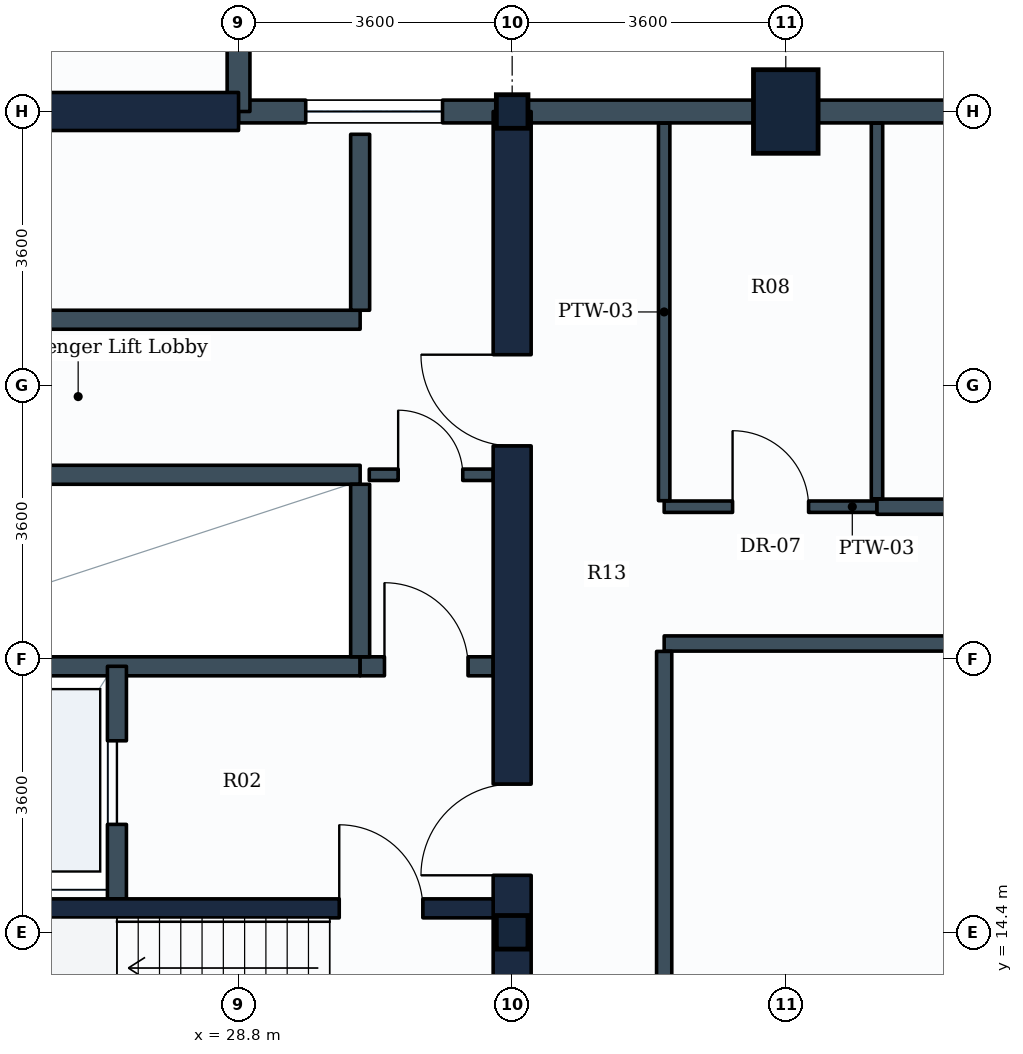
"""IFC4 building model, lengths in metres.
Left out: names, types, materials, properties, quantities, classifications, styles, units other than length and angle.
Written with IfcOpenShell. Run it as: python <this file> out.ifc"""

import sys

from ifc_helpers import new_model, si_unit, direction, frame, frame_2d, origin, origin_2d, place, context, subcontext, project, spatial, rectangle, i_section, extrude, element, fill, save


model = new_model("IFC4")
c1 = context("Model", 3, precision=1e-05, world=origin(), true_north=direction((0.0, 1.0)))
c2 = subcontext(c1, "Body", "Model", "MODEL_VIEW")
j1 = project(units=[si_unit("LENGTHUNIT", "METRE"), si_unit("PLANEANGLEUNIT", "RADIAN")], contexts=[c1])
p1 = place(None, origin())
s1 = spatial("IfcSite", under=j1, at=p1, CompositionType="ELEMENT")
p2 = place(p1, origin())
s2 = spatial("IfcBuilding", under=s1, at=p2, CompositionType="ELEMENT")
p3 = place(p2, frame((0.0, 0.0, 120.0)))
s3 = spatial("IfcBuildingStorey", under=s2, at=p3, CompositionType="ELEMENT", Elevation=120.0)
for number, where, z_axis, x_axis in (
    (1, (32.4, 14.4, 0.0), (0.0, 0.0, 1.0), (1.0, 0.0, 0.0)),
    (2, (32.4, 25.2, 0.0), (0.0, 0.0, 1.0), (1.0, 0.0, 0.0)),
):
    element("IfcColumn", number, at=place(p3, frame(where, z_axis=z_axis, x_axis=x_axis)), inside=s3, PredefinedType="COLUMN", context=c2, shape_type="SweptSolid", body=[
        extrude(i_section(OverallWidth=0.416, OverallDepth=0.442, WebThickness=0.025, FlangeThickness=0.041, FilletRadius=0.015, at=origin_2d()), origin(), (0.0, 0.0, 1.0), 3.8),
    ])
p4 = place(p3, frame((36.0, 25.2, 0.0), z_axis=(0.0, 0.0, 1.0), x_axis=(1.0, 0.0, 0.0)))
e3 = element("IfcColumn", 3, at=p4, inside=s3, PredefinedType="COLUMN", context=c2, shape_type="SweptSolid", body=[
    extrude(rectangle(XDim=0.85, YDim=1.1, at=origin_2d()), origin(), (0.0, 0.0, 1.0), 3.8),
])
for number, where, z_axis, x_axis in (
    (4, (36.0, 25.2, 0.0), (0.0, 0.0, 1.0), (1.0, 0.0, 0.0)),
    (5, (32.4, 25.2, 0.0), (0.0, 0.0, 1.0), (1.0, 0.0, 0.0)),
):
    element("IfcWall", number, at=place(p3, frame(where, z_axis=z_axis, x_axis=x_axis)), inside=s3, PredefinedType="STANDARD", context=c2, shape_type="SweptSolid", body=[
        extrude(rectangle(XDim=3.6, YDim=0.3, at=frame_2d((1.8, 0.0))), origin(), (0.0, 0.0, 1.0), 2.93),
    ])
p5 = place(p3, frame((28.8, 25.2, 0.0), z_axis=(0.0, 0.0, 1.0), x_axis=(1.0, 0.0, 0.0)))
e6 = element("IfcWall", 6, at=p5, inside=s3, PredefinedType="STANDARD", context=c2, shape_type="SweptSolid", body=[
    extrude(rectangle(XDim=3.6, YDim=0.3, at=frame_2d((1.8, 0.0))), origin(), (0.0, 0.0, 1.0), 3.535),
])
p6 = place(p5, frame((0.884, 0.0, 0.85)))
e7 = element("IfcOpeningElement", 7, at=p6, cuts=e6, PredefinedType="OPENING", context=c2, shape_type="SweptSolid", body=[
    extrude(rectangle(XDim=1.8, YDim=1.35, at=frame_2d((0.9, 0.675))), frame((0.0, 0.16, 0.0), z_axis=(0.0, -1.0, 0.0), x_axis=(1.0, 0.0, 0.0)), (0.0, 0.0, 1.0), 0.32),
])
p7 = place(p3, frame((28.8, 28.8, 0.0), z_axis=(0.0, 0.0, 1.0), x_axis=(0.0, -1.0, 0.0)))
e8 = element("IfcWall", 8, at=p7, inside=s3, PredefinedType="STANDARD", context=c2, shape_type="SweptSolid", body=[
    extrude(rectangle(XDim=3.6, YDim=0.3, at=frame_2d((1.8, 0.0))), origin(), (0.0, 0.0, 1.0), 3.09),
])
p8 = place(p3, frame((14.4, 25.2, 0.0), z_axis=(0.0, 0.0, 1.0), x_axis=(1.0, 0.0, 0.0)))
e9 = element("IfcWall", 9, at=p8, inside=s3, PredefinedType="SHEAR", context=c2, shape_type="SweptSolid", body=[
    extrude(rectangle(XDim=14.4, YDim=0.5, at=frame_2d((7.2, 0.0))), origin(), (0.0, 0.0, 1.0), 3.55),
])
p9 = place(p3, frame((32.4, 10.8, 0.0), z_axis=(0.0, 0.0, 1.0), x_axis=(0.0, 1.0, 0.0)))
e10 = element("IfcWall", 10, at=p9, inside=s3, PredefinedType="SHEAR", context=c2, shape_type="SweptSolid", body=[
    extrude(rectangle(XDim=14.4, YDim=0.5, at=frame_2d((7.2, 0.0))), origin(), (0.0, 0.0, 1.0), 3.55),
])
p10 = place(p9, frame((4.35, 0.0, 0.0)))
e11 = element("IfcOpeningElement", 11, at=p10, cuts=e10, PredefinedType="OPENING", context=c2, shape_type="SweptSolid", body=[
    extrude(rectangle(XDim=1.2, YDim=2.1, at=frame_2d((0.6, 1.05))), frame((0.0, 0.26, 0.0), z_axis=(0.0, -1.0, 0.0), x_axis=(1.0, 0.0, 0.0)), (0.0, 0.0, 1.0), 0.52),
])
p11 = place(p9, frame((10.0, 0.0, 0.0)))
e12 = element("IfcOpeningElement", 12, at=p11, cuts=e10, PredefinedType="OPENING", context=c2, shape_type="SweptSolid", body=[
    extrude(rectangle(XDim=1.2, YDim=2.1, at=frame_2d((0.6, 1.05))), frame((0.0, 0.26, 0.0), z_axis=(0.0, -1.0, 0.0), x_axis=(1.0, 0.0, 0.0)), (0.0, 0.0, 1.0), 0.52),
])
p12 = place(p3, frame((23.35, 14.715, 0.0), z_axis=(0.0, 0.0, 1.0), x_axis=(1.0, 0.0, 0.0)))
e13 = element("IfcWall", 13, at=p12, inside=s3, PredefinedType="SHEAR", context=c2, shape_type="SweptSolid", body=[
    extrude(rectangle(XDim=8.8, YDim=0.25, at=frame_2d((4.4, 0.0))), origin(), (0.0, 0.0, 1.0), 3.55),
])
p13 = place(p12, frame((6.775, 0.0, 0.0)))
e14 = element("IfcOpeningElement", 14, at=p13, cuts=e13, PredefinedType="OPENING", context=c2, shape_type="SweptSolid", body=[
    extrude(rectangle(XDim=1.1, YDim=2.1, at=frame_2d((0.55, 1.05))), frame((0.0, 0.135, 0.0), z_axis=(0.0, -1.0, 0.0), x_axis=(1.0, 0.0, 0.0)), (0.0, 0.0, 1.0), 0.27),
])
p14 = place(p3, frame((21.88, 17.9, 0.0), z_axis=(0.0, 0.0, 1.0), x_axis=(1.0, 0.0, 0.0)))
e15 = element("IfcWall", 15, at=p14, inside=s3, PredefinedType="PARTITIONING", context=c2, shape_type="SweptSolid", body=[
    extrude(rectangle(XDim=8.52, YDim=0.25, at=frame_2d((4.26, 0.0))), origin(), (0.0, 0.0, 1.0), 3.535),
])
p15 = place(p3, frame((30.4, 17.9, 0.0), z_axis=(0.0, 0.0, 1.0), x_axis=(1.0, 0.0, 0.0)))
e16 = element("IfcWall", 16, at=p15, inside=s3, PredefinedType="PARTITIONING", context=c2, shape_type="SweptSolid", body=[
    extrude(rectangle(XDim=1.75, YDim=0.25, at=frame_2d((0.875, 0.0))), origin(), (0.0, 0.0, 1.0), 3.535),
])
p16 = place(p15, frame((0.32, 0.0, 0.0)))
e17 = element("IfcOpeningElement", 17, at=p16, cuts=e16, PredefinedType="OPENING", context=c2, shape_type="SweptSolid", body=[
    extrude(rectangle(XDim=1.1, YDim=2.1, at=frame_2d((0.55, 1.05))), frame((0.0, 0.135, 0.0), z_axis=(0.0, -1.0, 0.0), x_axis=(1.0, 0.0, 0.0)), (0.0, 0.0, 1.0), 0.27),
])
p17 = place(p3, frame((27.2, 14.84, 0.0), z_axis=(0.0, 0.0, 1.0), x_axis=(0.0, 1.0, 0.0)))
e18 = element("IfcWall", 18, at=p17, inside=s3, PredefinedType="PARTITIONING", context=c2, shape_type="SweptSolid", body=[
    extrude(rectangle(XDim=3.06, YDim=0.25, at=frame_2d((1.53, 0.0))), origin(), (0.0, 0.0, 1.0), 3.535),
])
p18 = place(p17, frame((0.98, 0.0, 0.0)))
e19 = element("IfcOpeningElement", 19, at=p18, cuts=e18, PredefinedType="OPENING", context=c2, shape_type="SweptSolid", body=[
    extrude(rectangle(XDim=1.1, YDim=2.1, at=frame_2d((0.55, 1.05))), frame((0.0, 0.135, 0.0), z_axis=(0.0, -1.0, 0.0), x_axis=(1.0, 0.0, 0.0)), (0.0, 0.0, 1.0), 0.27),
])
p19 = place(p3, frame((23.18, 20.42, 0.0), z_axis=(0.0, 0.0, 1.0), x_axis=(1.0, 0.0, 0.0)))
e20 = element("IfcWall", 20, at=p19, inside=s3, PredefinedType="PARTITIONING", context=c2, shape_type="SweptSolid", body=[
    extrude(rectangle(XDim=7.22, YDim=0.25, at=frame_2d((3.61, 0.0))), origin(), (0.0, 0.0, 1.0), 3.535),
])
p20 = place(p3, frame((30.4, 18.025, 0.0), z_axis=(0.0, 0.0, 1.0), x_axis=(0.0, 1.0, 0.0)))
e21 = element("IfcWall", 21, at=p20, inside=s3, PredefinedType="PARTITIONING", context=c2, shape_type="SweptSolid", body=[
    extrude(rectangle(XDim=2.27, YDim=0.25, at=frame_2d((1.135, 0.0))), origin(), (0.0, 0.0, 1.0), 3.535),
])
p21 = place(p3, frame((23.18, 22.46, 0.0), z_axis=(0.0, 0.0, 1.0), x_axis=(1.0, 0.0, 0.0)))
e22 = element("IfcWall", 22, at=p21, inside=s3, PredefinedType="PARTITIONING", context=c2, shape_type="SweptSolid", body=[
    extrude(rectangle(XDim=7.22, YDim=0.25, at=frame_2d((3.61, 0.0))), origin(), (0.0, 0.0, 1.0), 3.535),
])
p22 = place(p3, frame((30.4, 22.585, 0.0), z_axis=(0.0, 0.0, 1.0), x_axis=(0.0, 1.0, 0.0)))
e23 = element("IfcWall", 23, at=p22, inside=s3, PredefinedType="PARTITIONING", context=c2, shape_type="SweptSolid", body=[
    extrude(rectangle(XDim=2.315, YDim=0.25, at=frame_2d((1.157, 0.0))), origin(), (0.0, 0.0, 1.0), 3.535),
])
p23 = place(p3, frame((30.52, 20.42, 0.0), z_axis=(0.0, 0.0, 1.0), x_axis=(1.0, 0.0, 0.0)))
e24 = element("IfcWall", 24, at=p23, inside=s3, PredefinedType="PARTITIONING", context=c2, shape_type="SweptSolid", body=[
    extrude(rectangle(XDim=1.63, YDim=0.15, at=frame_2d((0.815, 0.0))), origin(), (0.0, 0.0, 1.0), 3.535),
])
p24 = place(p23, frame((0.38, 0.0, 0.0)))
e25 = element("IfcOpeningElement", 25, at=p24, cuts=e24, PredefinedType="OPENING", context=c2, shape_type="SweptSolid", body=[
    extrude(rectangle(XDim=0.85, YDim=2.1, at=frame_2d((0.425, 1.05))), frame((0.0, 0.085, 0.0), z_axis=(0.0, -1.0, 0.0), x_axis=(1.0, 0.0, 0.0)), (0.0, 0.0, 1.0), 0.17),
])
p25 = place(p3, frame((34.4, 18.2, 0.0), z_axis=(0.0, 0.0, 1.0), x_axis=(1.0, 0.0, 0.0)))
e26 = element("IfcWall", 26, at=p25, inside=s3, PredefinedType="PARTITIONING", context=c2, shape_type="SweptSolid", body=[
    extrude(rectangle(XDim=11.6, YDim=0.2, at=frame_2d((5.8, 0.0))), origin(), (0.0, 0.0, 1.0), 3.08),
])
p26 = place(p25, frame((5.3, 0.0, 0.0)))
e27 = element("IfcOpeningElement", 27, at=p26, cuts=e26, PredefinedType="OPENING", context=c2, shape_type="SweptSolid", body=[
    extrude(rectangle(XDim=1.0, YDim=2.1, at=frame_2d((0.5, 1.05))), frame((0.0, 0.11, 0.0), z_axis=(0.0, -1.0, 0.0), x_axis=(1.0, 0.0, 0.0)), (0.0, 0.0, 1.0), 0.22),
])
p27 = place(p3, frame((34.4, 3.754, 0.0), z_axis=(0.0, 0.0, 1.0), x_axis=(0.0, 1.0, 0.0)))
e28 = element("IfcWall", 28, at=p27, inside=s3, PredefinedType="PARTITIONING", context=c2, shape_type="SweptSolid", body=[
    extrude(rectangle(XDim=14.342, YDim=0.2, at=frame_2d((7.171, 0.0))), origin(), (0.0, 0.0, 1.0), 2.93),
])
p28 = place(p3, frame((34.4, 20.0, 0.0), z_axis=(0.0, 0.0, 1.0), x_axis=(1.0, 0.0, 0.0)))
e29 = element("IfcWall", 29, at=p28, inside=s3, PredefinedType="PARTITIONING", context=c2, shape_type="SweptSolid", body=[
    extrude(rectangle(XDim=2.8, YDim=0.15, at=frame_2d((1.4, 0.0))), origin(), (0.0, 0.0, 1.0), 3.08),
])
p29 = place(p28, frame((0.9, 0.0, 0.0)))
e30 = element("IfcOpeningElement", 30, at=p29, cuts=e29, PredefinedType="OPENING", context=c2, shape_type="SweptSolid", body=[
    extrude(rectangle(XDim=1.0, YDim=2.1, at=frame_2d((0.5, 1.05))), frame((0.0, 0.085, 0.0), z_axis=(0.0, -1.0, 0.0), x_axis=(1.0, 0.0, 0.0)), (0.0, 0.0, 1.0), 0.17),
])
p30 = place(p3, frame((37.2, 20.0, 0.0), z_axis=(0.0, 0.0, 1.0), x_axis=(1.0, 0.0, 0.0)))
e31 = element("IfcWall", 31, at=p30, inside=s3, PredefinedType="PARTITIONING", context=c2, shape_type="SweptSolid", body=[
    extrude(rectangle(XDim=20.246, YDim=0.2, at=frame_2d((10.123, 0.0))), origin(), (0.0, 0.0, 1.0), 2.93),
])
p31 = place(p30, frame((9.56, 0.0, 0.0)))
e32 = element("IfcOpeningElement", 32, at=p31, cuts=e31, PredefinedType="OPENING", context=c2, shape_type="SweptSolid", body=[
    extrude(rectangle(XDim=1.2, YDim=2.1, at=frame_2d((0.6, 1.05))), frame((0.0, 0.11, 0.0), z_axis=(0.0, -1.0, 0.0), x_axis=(1.0, 0.0, 0.0)), (0.0, 0.0, 1.0), 0.22),
])
p32 = place(p3, frame((34.4, 20.079, 0.0), z_axis=(0.0, 0.0, 1.0), x_axis=(0.0, 1.0, 0.0)))
e33 = element("IfcWall", 33, at=p32, inside=s3, PredefinedType="PARTITIONING", context=c2, shape_type="SweptSolid", body=[
    extrude(rectangle(XDim=4.967, YDim=0.15, at=frame_2d((2.483, 0.0))), origin(), (0.0, 0.0, 1.0), 2.93),
])
p33 = place(p3, frame((37.2, 20.104, 0.0), z_axis=(0.0, 0.0, 1.0), x_axis=(0.0, 1.0, 0.0)))
e34 = element("IfcWall", 34, at=p33, inside=s3, PredefinedType="PARTITIONING", context=c2, shape_type="SweptSolid", body=[
    extrude(rectangle(XDim=4.942, YDim=0.15, at=frame_2d((2.471, 0.0))), origin(), (0.0, 0.0, 1.0), 2.93),
])
p34 = place(p6, origin())
e35 = element("IfcWindow", 35, at=p34, inside=s3, PartitioningType="SINGLE_PANEL", PredefinedType="WINDOW", context=c2, shape_type="SweptSolid", body=[
    extrude(rectangle(XDim=1.8, YDim=1.35, at=frame_2d((0.9, 0.675))), frame((0.0, 0.03, 0.0), z_axis=(0.0, -1.0, 0.0), x_axis=(1.0, 0.0, 0.0)), (0.0, 0.0, 1.0), 0.06),
])
fill(e7, e35)
p35 = place(p13, origin())
e36 = element("IfcDoor", 36, at=p35, inside=s3, OperationType="SINGLE_SWING_LEFT", PredefinedType="DOOR", context=c2, shape_type="SweptSolid", body=[
    extrude(rectangle(XDim=1.1, YDim=2.1, at=frame_2d((0.55, 1.05))), frame((0.0, 0.025, 0.0), z_axis=(0.0, -1.0, 0.0), x_axis=(1.0, 0.0, 0.0)), (0.0, 0.0, 1.0), 0.05),
])
fill(e14, e36)
p36 = place(p18, origin())
e37 = element("IfcDoor", 37, at=p36, inside=s3, OperationType="SLIDING_TO_LEFT", PredefinedType="DOOR", context=c2, shape_type="SweptSolid", body=[
    extrude(rectangle(XDim=1.1, YDim=2.1, at=frame_2d((0.55, 1.05))), frame((0.0, 0.025, 0.0), z_axis=(0.0, -1.0, 0.0), x_axis=(1.0, 0.0, 0.0)), (0.0, 0.0, 1.0), 0.05),
])
fill(e19, e37)
p37 = place(p10, origin())
e38 = element("IfcDoor", 38, at=p37, inside=s3, OperationType="SINGLE_SWING_LEFT", PredefinedType="DOOR", context=c2, shape_type="SweptSolid", body=[
    extrude(rectangle(XDim=1.2, YDim=2.1, at=frame_2d((0.6, 1.05))), frame((0.0, 0.025, 0.0), z_axis=(0.0, -1.0, 0.0), x_axis=(1.0, 0.0, 0.0)), (0.0, 0.0, 1.0), 0.05),
])
fill(e11, e38)
p38 = place(p16, origin())
e39 = element("IfcDoor", 39, at=p38, inside=s3, OperationType="SINGLE_SWING_LEFT", PredefinedType="DOOR", context=c2, shape_type="SweptSolid", body=[
    extrude(rectangle(XDim=1.1, YDim=2.1, at=frame_2d((0.55, 1.05))), frame((0.0, 0.025, 0.0), z_axis=(0.0, -1.0, 0.0), x_axis=(1.0, 0.0, 0.0)), (0.0, 0.0, 1.0), 0.05),
])
fill(e17, e39)
p39 = place(p11, origin())
e40 = element("IfcDoor", 40, at=p39, inside=s3, OperationType="SINGLE_SWING_RIGHT", PredefinedType="DOOR", context=c2, shape_type="SweptSolid", body=[
    extrude(rectangle(XDim=1.2, YDim=2.1, at=frame_2d((0.6, 1.05))), frame((0.0, 0.025, 0.0), z_axis=(0.0, -1.0, 0.0), x_axis=(1.0, 0.0, 0.0)), (0.0, 0.0, 1.0), 0.05),
])
fill(e12, e40)
p40 = place(p24, origin())
e41 = element("IfcDoor", 41, at=p40, inside=s3, OperationType="SINGLE_SWING_LEFT", PredefinedType="DOOR", context=c2, shape_type="SweptSolid", body=[
    extrude(rectangle(XDim=0.85, YDim=2.1, at=frame_2d((0.425, 1.05))), frame((0.0, 0.025, 0.0), z_axis=(0.0, -1.0, 0.0), x_axis=(1.0, 0.0, 0.0)), (0.0, 0.0, 1.0), 0.05),
])
fill(e25, e41)
p41 = place(p29, origin())
e42 = element("IfcDoor", 42, at=p41, inside=s3, OperationType="SINGLE_SWING_LEFT", PredefinedType="DOOR", context=c2, shape_type="SweptSolid", body=[
    extrude(rectangle(XDim=1.0, YDim=2.1, at=frame_2d((0.5, 1.05))), frame((0.0, 0.025, 0.0), z_axis=(0.0, -1.0, 0.0), x_axis=(1.0, 0.0, 0.0)), (0.0, 0.0, 1.0), 0.05),
])
fill(e30, e42)
save(model, sys.argv[1])
